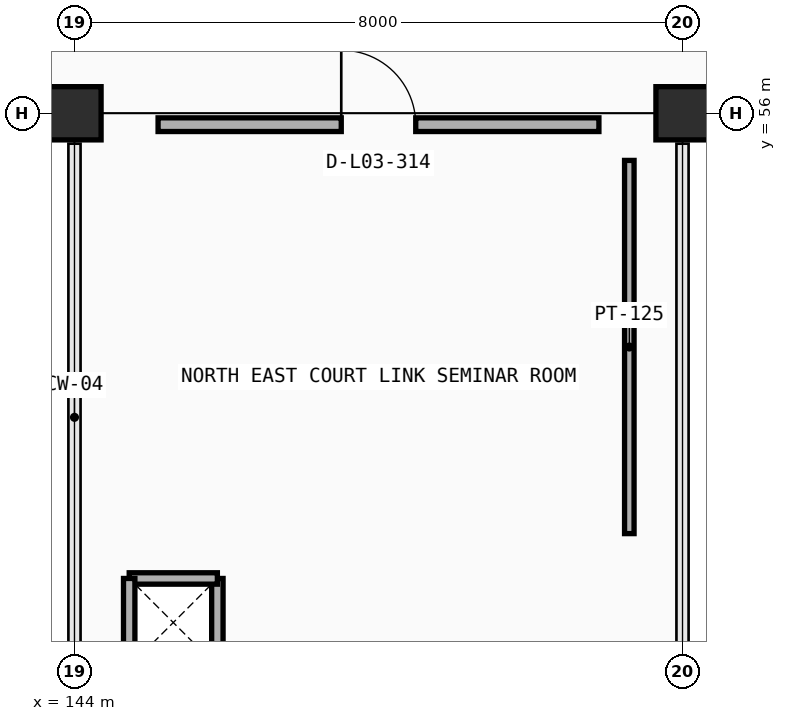
"""IFC4 building model, lengths in metres.
Left out: names, types, materials, properties, quantities, classifications, styles, units other than length and angle.
Written with IfcOpenShell. Run it as: python <this file> out.ifc"""

import sys

from ifc_helpers import new_model, si_unit, direction, frame, frame_2d, origin, origin_2d, place, context, subcontext, project, spatial, rectangle, extrude, element, fill, save


model = new_model("IFC4")
c1 = context("Model", 3, precision=1e-05, world=origin(), true_north=direction((0.0, 1.0)))
c2 = subcontext(c1, "Body", "Model", "MODEL_VIEW")
j1 = project(units=[si_unit("LENGTHUNIT", "METRE"), si_unit("PLANEANGLEUNIT", "RADIAN")], contexts=[c1])
p1 = place(None, origin())
s1 = spatial("IfcSite", under=j1, at=p1, CompositionType="ELEMENT")
p2 = place(p1, origin())
s2 = spatial("IfcBuilding", under=s1, at=p2, CompositionType="ELEMENT")
p3 = place(p2, frame((0.0, 0.0, 9.6)))
s3 = spatial("IfcBuildingStorey", under=s2, at=p3, CompositionType="ELEMENT", Elevation=9.6)
for number, where, z_axis, x_axis in (
    (1, (144.0, 56.0, 0.0), (0.0, 0.0, 1.0), (1.0, 0.0, 0.0)),
    (2, (152.0, 56.0, 0.0), (0.0, 0.0, 1.0), (1.0, 0.0, 0.0)),
):
    element("IfcColumn", number, at=place(p3, frame(where, z_axis=z_axis, x_axis=x_axis)), inside=s3, PredefinedType="COLUMN", context=c2, shape_type="SweptSolid", body=[
        extrude(rectangle(XDim=0.7, YDim=0.7, at=origin_2d()), origin(), (0.0, 0.0, 1.0), 4.2),
    ])
for number, where, z_axis, x_axis in (
    (3, (145.88, 48.72, 0.0), (0.0, 0.0, 1.0), (0.0, 1.0, 0.0)),
    (4, (145.88, 49.88, 0.0), (0.0, 0.0, 1.0), (-1.0, 0.0, 0.0)),
    (5, (144.72, 49.88, 0.0), (0.0, 0.0, 1.0), (0.0, -1.0, 0.0)),
):
    element("IfcWall", number, at=place(p3, frame(where, z_axis=z_axis, x_axis=x_axis)), inside=s3, PredefinedType="PARTITIONING", context=c2, shape_type="SweptSolid", body=[
        extrude(rectangle(XDim=1.16, YDim=0.15, at=frame_2d((0.58, 0.0))), origin(), (0.0, 0.0, 1.0), 3.9),
    ])
p4 = place(p3, frame((145.1, 55.85, 0.0), z_axis=(0.0, 0.0, 1.0), x_axis=(1.0, 0.0, 0.0)))
e6 = element("IfcWall", 6, at=p4, inside=s3, PredefinedType="PARTITIONING", context=c2, shape_type="SweptSolid", body=[
    extrude(rectangle(XDim=5.8, YDim=0.18, at=frame_2d((2.9, 0.0))), origin(), (0.0, 0.0, 1.0), 3.3),
])
p5 = place(p4, frame((2.41, 0.0, 0.0)))
e7 = element("IfcOpeningElement", 7, at=p5, cuts=e6, PredefinedType="OPENING", context=c2, shape_type="SweptSolid", body=[
    extrude(rectangle(XDim=0.98, YDim=2.1, at=frame_2d((0.49, 1.05))), frame((0.0, 0.1, 0.0), z_axis=(0.0, -1.0, 0.0), x_axis=(1.0, 0.0, 0.0)), (0.0, 0.0, 1.0), 0.2),
])
p6 = place(p3, frame((151.3, 50.47, 0.0), z_axis=(0.0, 0.0, 1.0), x_axis=(0.0, 1.0, 0.0)))
e8 = element("IfcWall", 8, at=p6, inside=s3, PredefinedType="PARTITIONING", context=c2, shape_type="SweptSolid", body=[
    extrude(rectangle(XDim=4.91, YDim=0.125, at=frame_2d((2.455, 0.0))), origin(), (0.0, 0.0, 1.0), 3.3),
])
p7 = place(p5, origin())
e9 = element("IfcDoor", 9, at=p7, inside=s3, OperationType="SINGLE_SWING_LEFT", PredefinedType="DOOR", context=c2, shape_type="SweptSolid", body=[
    extrude(rectangle(XDim=0.98, YDim=2.1, at=frame_2d((0.49, 1.05))), frame((0.0, 0.025, 0.0), z_axis=(0.0, -1.0, 0.0), x_axis=(1.0, 0.0, 0.0)), (0.0, 0.0, 1.0), 0.05),
])
fill(e7, e9)
save(model, sys.argv[1])
